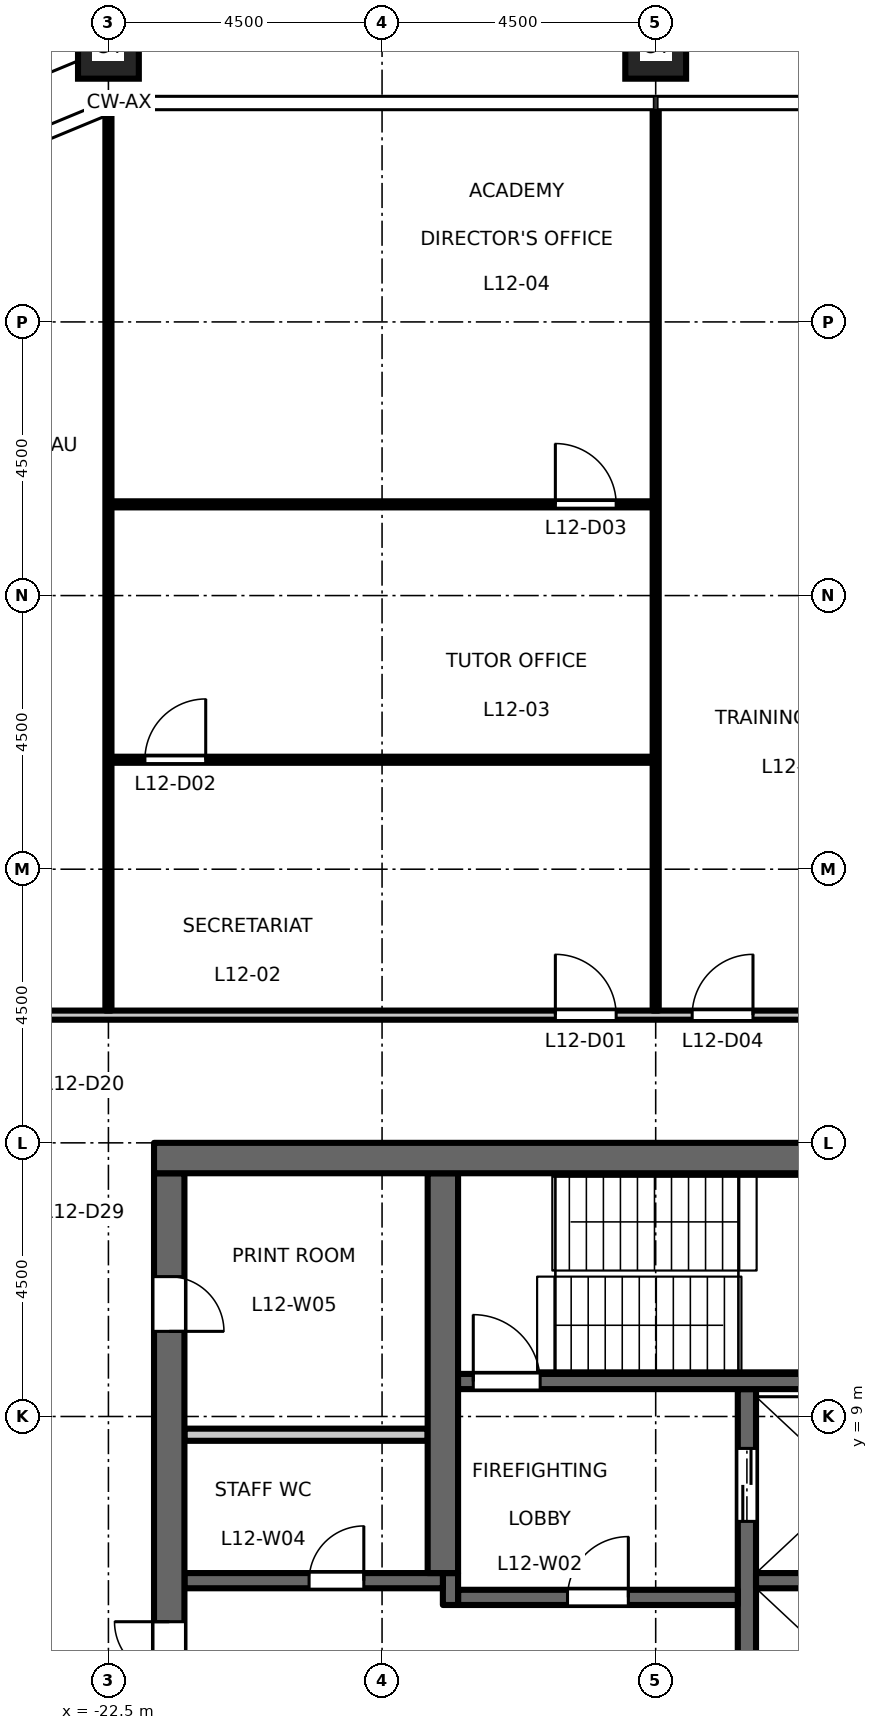
"""IFC4 building model, lengths in metres.
Left out: names, types, materials, properties, quantities, classifications, styles, units other than length and angle.
Written with IfcOpenShell. Run it as: python <this file> out.ifc"""

import sys

from ifc_helpers import new_model, si_unit, direction, frame, frame_2d, origin, origin_2d, place, context, subcontext, project, spatial, rectangle, hollow_rectangle, extrude, element, fill, save


model = new_model("IFC4")
c1 = context("Model", 3, precision=1e-05, world=origin(), true_north=direction((0.0, 1.0)))
c2 = subcontext(c1, "Body", "Model", "MODEL_VIEW")
j1 = project(units=[si_unit("LENGTHUNIT", "METRE"), si_unit("PLANEANGLEUNIT", "RADIAN")], contexts=[c1])
p1 = place(None, origin())
s1 = spatial("IfcSite", under=j1, at=p1, CompositionType="ELEMENT")
p2 = place(p1, origin())
s2 = spatial("IfcBuilding", under=s1, at=p2, CompositionType="ELEMENT")
p3 = place(p2, frame((0.0, 0.0, 58.2)))
s3 = spatial("IfcBuildingStorey", under=s2, at=p3, CompositionType="ELEMENT", Elevation=58.2)
for number, where, z_axis, x_axis in (
    (1, (-13.5, 31.5, 0.0), (0.0, 0.0, 1.0), (1.0, 0.0, 0.0)),
    (2, (-22.5, 31.5, 0.0), (0.0, 0.0, 1.0), (1.0, 0.0, 0.0)),
):
    element("IfcColumn", number, at=place(p3, frame(where, z_axis=z_axis, x_axis=x_axis)), inside=s3, PredefinedType="COLUMN", context=c2, shape_type="SweptSolid", body=[
        extrude(hollow_rectangle(XDim=1.0, YDim=1.0, WallThickness=0.06, at=origin_2d()), origin(), (0.0, 0.0, 1.0), 4.5),
    ])
p4 = place(p3, frame((-12.0, -9.45, 0.0), z_axis=(0.0, 0.0, 1.0), x_axis=(0.0, 1.0, 0.0)))
e3 = element("IfcWall", 3, at=p4, inside=s3, PredefinedType="SHEAR", context=c2, shape_type="SweptSolid", body=[
    extrude(rectangle(XDim=18.9, YDim=0.3, at=frame_2d((9.45, 0.0))), origin(), (0.0, 0.0, 1.0), 4.35),
])
p5 = place(p4, frame((3.625, 0.0, 0.0)))
e4 = element("IfcOpeningElement", 4, at=p5, cuts=e3, PredefinedType="OPENING", context=c2, shape_type="SweptSolid", body=[
    extrude(rectangle(XDim=1.1, YDim=2.1, at=frame_2d((0.55, 1.05))), frame((0.0, 0.16, 0.0), z_axis=(0.0, -1.0, 0.0), x_axis=(1.0, 0.0, 0.0)), (0.0, 0.0, 1.0), 0.32),
])
p6 = place(p4, frame((6.775, 0.0, 0.0)))
e5 = element("IfcOpeningElement", 5, at=p6, cuts=e3, PredefinedType="OPENING", context=c2, shape_type="SweptSolid", body=[
    extrude(rectangle(XDim=1.1, YDim=2.1, at=frame_2d((0.55, 1.05))), frame((0.0, 0.16, 0.0), z_axis=(0.0, -1.0, 0.0), x_axis=(1.0, 0.0, 0.0)), (0.0, 0.0, 1.0), 0.32),
])
p7 = place(p4, frame((9.925, 0.0, 0.0)))
e6 = element("IfcOpeningElement", 6, at=p7, cuts=e3, PredefinedType="OPENING", context=c2, shape_type="SweptSolid", body=[
    extrude(rectangle(XDim=1.1, YDim=2.1, at=frame_2d((0.55, 1.05))), frame((0.0, 0.16, 0.0), z_axis=(0.0, -1.0, 0.0), x_axis=(1.0, 0.0, 0.0)), (0.0, 0.0, 1.0), 0.32),
])
p8 = place(p4, frame((13.075, 0.0, 0.0)))
e7 = element("IfcOpeningElement", 7, at=p8, cuts=e3, PredefinedType="OPENING", context=c2, shape_type="SweptSolid", body=[
    extrude(rectangle(XDim=1.1, YDim=2.1, at=frame_2d((0.55, 1.05))), frame((0.0, 0.16, 0.0), z_axis=(0.0, -1.0, 0.0), x_axis=(1.0, 0.0, 0.0)), (0.0, 0.0, 1.0), 0.32),
])
p9 = place(p4, frame((16.725, 0.0, 0.0)))
e8 = element("IfcOpeningElement", 8, at=p9, cuts=e3, PredefinedType="OPENING", context=c2, shape_type="SweptSolid", body=[
    extrude(rectangle(XDim=1.2, YDim=2.1, at=frame_2d((0.6, 1.05))), frame((0.0, 0.16, 0.0), z_axis=(0.0, -1.0, 0.0), x_axis=(1.0, 0.0, 0.0)), (0.0, 0.0, 1.0), 0.32),
])
p10 = place(p4, frame((0.975, 0.0, 0.0)))
e9 = element("IfcOpeningElement", 9, at=p10, cuts=e3, PredefinedType="OPENING", context=c2, shape_type="SweptSolid", body=[
    extrude(rectangle(XDim=1.2, YDim=2.1, at=frame_2d((0.6, 1.05))), frame((0.0, 0.16, 0.0), z_axis=(0.0, -1.0, 0.0), x_axis=(1.0, 0.0, 0.0)), (0.0, 0.0, 1.0), 0.32),
])
p11 = place(p3, frame((-12.15, 6.025, 0.0), z_axis=(0.0, 0.0, 1.0), x_axis=(-1.0, 0.0, 0.0)))
e10 = element("IfcWall", 10, at=p11, inside=s3, PredefinedType="SHEAR", context=c2, shape_type="SweptSolid", body=[
    extrude(rectangle(XDim=4.6, YDim=0.25, at=frame_2d((2.3, 0.0))), origin(), (0.0, 0.0, 1.0), 4.35),
])
p12 = place(p11, frame((1.8, 0.0, 0.0)))
e11 = element("IfcOpeningElement", 11, at=p12, cuts=e10, PredefinedType="OPENING", context=c2, shape_type="SweptSolid", body=[
    extrude(rectangle(XDim=1.0, YDim=2.1, at=frame_2d((0.5, 1.05))), frame((0.0, 0.135, 0.0), z_axis=(0.0, -1.0, 0.0), x_axis=(1.0, 0.0, 0.0)), (0.0, 0.0, 1.0), 0.27),
])
p13 = place(p3, frame((-16.875, 5.9, 0.0), z_axis=(0.0, 0.0, 1.0), x_axis=(0.0, 1.0, 0.0)))
e12 = element("IfcWall", 12, at=p13, inside=s3, PredefinedType="SHEAR", context=c2, shape_type="SweptSolid", body=[
    extrude(rectangle(XDim=0.525, YDim=0.25, at=frame_2d((0.263, 0.0))), origin(), (0.0, 0.0, 1.0), 4.35),
])
p14 = place(p3, frame((-17.0, 6.3, 0.0), z_axis=(0.0, 0.0, 1.0), x_axis=(-1.0, 0.0, 0.0)))
e13 = element("IfcWall", 13, at=p14, inside=s3, PredefinedType="SHEAR", context=c2, shape_type="SweptSolid", body=[
    extrude(rectangle(XDim=4.25, YDim=0.25, at=frame_2d((2.125, 0.0))), origin(), (0.0, 0.0, 1.0), 4.35),
])
p15 = place(p14, frame((1.3, 0.0, 0.0)))
e14 = element("IfcOpeningElement", 14, at=p15, cuts=e13, PredefinedType="OPENING", context=c2, shape_type="SweptSolid", body=[
    extrude(rectangle(XDim=0.9, YDim=2.1, at=frame_2d((0.45, 1.05))), frame((0.0, 0.135, 0.0), z_axis=(0.0, -1.0, 0.0), x_axis=(1.0, 0.0, 0.0)), (0.0, 0.0, 1.0), 0.27),
])
p16 = place(p3, frame((-21.5, -13.0, 0.0), z_axis=(0.0, 0.0, 1.0), x_axis=(0.0, 1.0, 0.0)))
e15 = element("IfcWall", 15, at=p16, inside=s3, PredefinedType="SHEAR", context=c2, shape_type="SweptSolid", body=[
    extrude(rectangle(XDim=26.0, YDim=0.5, at=frame_2d((13.0, 0.0))), origin(), (0.0, 0.0, 1.0), 4.35),
])
p17 = place(p16, frame((16.825, 0.0, 0.0)))
e16 = element("IfcOpeningElement", 16, at=p17, cuts=e15, PredefinedType="OPENING", context=c2, shape_type="SweptSolid", body=[
    extrude(rectangle(XDim=1.8, YDim=2.1, at=frame_2d((0.9, 1.05))), frame((0.0, 0.26, 0.0), z_axis=(0.0, -1.0, 0.0), x_axis=(1.0, 0.0, 0.0)), (0.0, 0.0, 1.0), 0.52),
])
p18 = place(p16, frame((7.375, 0.0, 0.0)))
e17 = element("IfcOpeningElement", 17, at=p18, cuts=e15, PredefinedType="OPENING", context=c2, shape_type="SweptSolid", body=[
    extrude(rectangle(XDim=1.8, YDim=2.1, at=frame_2d((0.9, 1.05))), frame((0.0, 0.26, 0.0), z_axis=(0.0, -1.0, 0.0), x_axis=(1.0, 0.0, 0.0)), (0.0, 0.0, 1.0), 0.52),
])
p19 = place(p16, frame((23.4, 0.0, 0.0)))
e18 = element("IfcOpeningElement", 18, at=p19, cuts=e15, PredefinedType="OPENING", context=c2, shape_type="SweptSolid", body=[
    extrude(rectangle(XDim=0.9, YDim=2.1, at=frame_2d((0.45, 1.05))), frame((0.0, 0.26, 0.0), z_axis=(0.0, -1.0, 0.0), x_axis=(1.0, 0.0, 0.0)), (0.0, 0.0, 1.0), 0.52),
])
p20 = place(p3, frame((-17.25, 8.7, 0.0), z_axis=(0.0, 0.0, 1.0), x_axis=(-1.0, 0.0, 0.0)))
e19 = element("IfcWall", 19, at=p20, inside=s3, PredefinedType="PARTITIONING", context=c2, shape_type="SweptSolid", body=[
    extrude(rectangle(XDim=4.0, YDim=0.2, at=frame_2d((2.0, 0.0))), origin(), (0.0, 0.0, 1.0), 4.35),
])
p21 = place(p3, frame((-17.0, 6.425, 0.0), z_axis=(0.0, 0.0, 1.0), x_axis=(0.0, 1.0, 0.0)))
e20 = element("IfcWall", 20, at=p21, inside=s3, PredefinedType="SHEAR", context=c2, shape_type="SweptSolid", body=[
    extrude(rectangle(XDim=6.575, YDim=0.5, at=frame_2d((3.288, 0.0))), origin(), (0.0, 0.0, 1.0), 4.35),
])
p22 = place(p3, frame((-8.75, 6.3, 0.0), z_axis=(0.0, 0.0, 1.0), x_axis=(-1.0, 0.0, 0.0)))
e21 = element("IfcWall", 21, at=p22, inside=s3, PredefinedType="SHEAR", context=c2, shape_type="SweptSolid", body=[
    extrude(rectangle(XDim=3.1, YDim=0.25, at=frame_2d((1.55, 0.0))), origin(), (0.0, 0.0, 1.0), 4.35),
])
p23 = place(p3, frame((-8.75, 9.575, 0.0), z_axis=(0.0, 0.0, 1.0), x_axis=(-1.0, 0.0, 0.0)))
e22 = element("IfcWall", 22, at=p23, inside=s3, PredefinedType="SHEAR", context=c2, shape_type="SweptSolid", body=[
    extrude(rectangle(XDim=8.0, YDim=0.25, at=frame_2d((4.0, 0.0))), origin(), (0.0, 0.0, 1.0), 4.35),
])
p24 = place(p23, frame((6.65, 0.0, 0.0)))
e23 = element("IfcOpeningElement", 23, at=p24, cuts=e22, PredefinedType="OPENING", context=c2, shape_type="SweptSolid", body=[
    extrude(rectangle(XDim=1.1, YDim=2.1, at=frame_2d((0.55, 1.05))), frame((0.0, 0.135, 0.0), z_axis=(0.0, -1.0, 0.0), x_axis=(1.0, 0.0, 0.0)), (0.0, 0.0, 1.0), 0.27),
])
p25 = place(p3, frame((-8.25, 13.25, 0.0), z_axis=(0.0, 0.0, 1.0), x_axis=(-1.0, 0.0, 0.0)))
e24 = element("IfcWall", 24, at=p25, inside=s3, PredefinedType="SHEAR", context=c2, shape_type="SweptSolid", body=[
    extrude(rectangle(XDim=13.5, YDim=0.5, at=frame_2d((6.75, 0.0))), origin(), (0.0, 0.0, 1.0), 4.35),
])
p26 = place(p3, frame((-23.925, 15.6, 0.0), z_axis=(0.0, 0.0, 1.0), x_axis=(1.0, 0.0, 0.0)))
e25 = element("IfcWall", 25, at=p26, inside=s3, PredefinedType="PARTITIONING", context=c2, shape_type="SweptSolid", body=[
    extrude(rectangle(XDim=47.85, YDim=0.15, at=frame_2d((23.925, 0.0))), origin(), (0.0, 0.0, 1.0), 4.35),
])
p27 = place(p26, frame((8.775, 0.0, 0.0)))
e26 = element("IfcOpeningElement", 26, at=p27, cuts=e25, PredefinedType="OPENING", context=c2, shape_type="SweptSolid", body=[
    extrude(rectangle(XDim=1.0, YDim=2.1, at=frame_2d((0.5, 1.05))), frame((0.0, 0.085, 0.0), z_axis=(0.0, -1.0, 0.0), x_axis=(1.0, 0.0, 0.0)), (0.0, 0.0, 1.0), 0.17),
])
p28 = place(p26, frame((11.025, 0.0, 0.0)))
e27 = element("IfcOpeningElement", 27, at=p28, cuts=e25, PredefinedType="OPENING", context=c2, shape_type="SweptSolid", body=[
    extrude(rectangle(XDim=1.0, YDim=2.1, at=frame_2d((0.5, 1.05))), frame((0.0, 0.085, 0.0), z_axis=(0.0, -1.0, 0.0), x_axis=(1.0, 0.0, 0.0)), (0.0, 0.0, 1.0), 0.17),
])
p29 = place(p26, frame((26.775, 0.0, 0.0)))
e28 = element("IfcOpeningElement", 28, at=p29, cuts=e25, PredefinedType="OPENING", context=c2, shape_type="SweptSolid", body=[
    extrude(rectangle(XDim=1.0, YDim=2.1, at=frame_2d((0.5, 1.05))), frame((0.0, 0.085, 0.0), z_axis=(0.0, -1.0, 0.0), x_axis=(1.0, 0.0, 0.0)), (0.0, 0.0, 1.0), 0.17),
])
p30 = place(p26, frame((29.025, 0.0, 0.0)))
e29 = element("IfcOpeningElement", 29, at=p30, cuts=e25, PredefinedType="OPENING", context=c2, shape_type="SweptSolid", body=[
    extrude(rectangle(XDim=1.0, YDim=2.1, at=frame_2d((0.5, 1.05))), frame((0.0, 0.085, 0.0), z_axis=(0.0, -1.0, 0.0), x_axis=(1.0, 0.0, 0.0)), (0.0, 0.0, 1.0), 0.17),
])
p31 = place(p26, frame((38.025, 0.0, 0.0)))
e30 = element("IfcOpeningElement", 30, at=p31, cuts=e25, PredefinedType="OPENING", context=c2, shape_type="SweptSolid", body=[
    extrude(rectangle(XDim=1.0, YDim=2.1, at=frame_2d((0.5, 1.05))), frame((0.0, 0.085, 0.0), z_axis=(0.0, -1.0, 0.0), x_axis=(1.0, 0.0, 0.0)), (0.0, 0.0, 1.0), 0.17),
])
p32 = place(p3, frame((-22.45, 19.8, 0.0), z_axis=(0.0, 0.0, 1.0), x_axis=(1.0, 0.0, 0.0)))
e31 = element("IfcWall", 31, at=p32, inside=s3, PredefinedType="PARTITIONING", context=c2, shape_type="SweptSolid", body=[
    extrude(rectangle(XDim=8.9, YDim=0.1, at=frame_2d((4.45, 0.0))), origin(), (0.0, 0.0, 1.0), 4.35),
])
p33 = place(p32, frame((0.55, 0.0, 0.0)))
e32 = element("IfcOpeningElement", 32, at=p33, cuts=e31, PredefinedType="OPENING", context=c2, shape_type="SweptSolid", body=[
    extrude(rectangle(XDim=1.0, YDim=2.1, at=frame_2d((0.5, 1.05))), frame((0.0, 0.06, 0.0), z_axis=(0.0, -1.0, 0.0), x_axis=(1.0, 0.0, 0.0)), (0.0, 0.0, 1.0), 0.12),
])
p34 = place(p3, frame((-22.45, 24.0, 0.0), z_axis=(0.0, 0.0, 1.0), x_axis=(1.0, 0.0, 0.0)))
e33 = element("IfcWall", 33, at=p34, inside=s3, PredefinedType="PARTITIONING", context=c2, shape_type="SweptSolid", body=[
    extrude(rectangle(XDim=8.9, YDim=0.1, at=frame_2d((4.45, 0.0))), origin(), (0.0, 0.0, 1.0), 3.85),
])
p35 = place(p34, frame((7.3, 0.0, 0.0)))
e34 = element("IfcOpeningElement", 34, at=p35, cuts=e33, PredefinedType="OPENING", context=c2, shape_type="SweptSolid", body=[
    extrude(rectangle(XDim=1.0, YDim=2.1, at=frame_2d((0.5, 1.05))), frame((0.0, 0.06, 0.0), z_axis=(0.0, -1.0, 0.0), x_axis=(1.0, 0.0, 0.0)), (0.0, 0.0, 1.0), 0.12),
])
p36 = place(p3, frame((-22.5, 15.675, 0.0), z_axis=(0.0, 0.0, 1.0), x_axis=(0.0, 1.0, 0.0)))
e35 = element("IfcWall", 35, at=p36, inside=s3, PredefinedType="PARTITIONING", context=c2, shape_type="SweptSolid", body=[
    extrude(rectangle(XDim=14.753, YDim=0.1, at=frame_2d((7.376, 0.0))), origin(), (0.0, 0.0, 1.0), 3.35),
])
p37 = place(p3, frame((-13.5, 15.675, 0.0), z_axis=(0.0, 0.0, 1.0), x_axis=(0.0, 1.0, 0.0)))
e36 = element("IfcWall", 36, at=p37, inside=s3, PredefinedType="PARTITIONING", context=c2, shape_type="SweptSolid", body=[
    extrude(rectangle(XDim=14.835, YDim=0.1, at=frame_2d((7.417, 0.0))), origin(), (0.0, 0.0, 1.0), 3.35),
])
p38 = place(p12, origin())
e37 = element("IfcDoor", 37, at=p38, inside=s3, OperationType="SINGLE_SWING_LEFT", PredefinedType="DOOR", context=c2, shape_type="SweptSolid", body=[
    extrude(rectangle(XDim=1.0, YDim=2.1, at=frame_2d((0.5, 1.05))), frame((0.0, 0.025, 0.0), z_axis=(0.0, -1.0, 0.0), x_axis=(1.0, 0.0, 0.0)), (0.0, 0.0, 1.0), 0.05),
])
fill(e11, e37)
p39 = place(p24, origin())
e38 = element("IfcDoor", 38, at=p39, inside=s3, OperationType="SINGLE_SWING_RIGHT", PredefinedType="DOOR", context=c2, shape_type="SweptSolid", body=[
    extrude(rectangle(XDim=1.1, YDim=2.1, at=frame_2d((0.55, 1.05))), frame((0.0, 0.025, 0.0), z_axis=(0.0, -1.0, 0.0), x_axis=(1.0, 0.0, 0.0)), (0.0, 0.0, 1.0), 0.05),
])
fill(e23, e38)
p40 = place(p17, origin())
e39 = element("IfcDoor", 39, at=p40, inside=s3, OperationType="DOUBLE_DOOR_DOUBLE_SWING", PredefinedType="DOOR", context=c2, shape_type="SweptSolid", body=[
    extrude(rectangle(XDim=1.8, YDim=2.1, at=frame_2d((0.9, 1.05))), frame((0.0, 0.025, 0.0), z_axis=(0.0, -1.0, 0.0), x_axis=(1.0, 0.0, 0.0)), (0.0, 0.0, 1.0), 0.05),
])
fill(e16, e39)
p41 = place(p9, origin())
e40 = element("IfcDoor", 40, at=p41, inside=s3, OperationType="DOUBLE_DOOR_SLIDING", PredefinedType="DOOR", context=c2, shape_type="SweptSolid", body=[
    extrude(rectangle(XDim=1.2, YDim=2.1, at=frame_2d((0.6, 1.05))), frame((0.0, 0.025, 0.0), z_axis=(0.0, -1.0, 0.0), x_axis=(1.0, 0.0, 0.0)), (0.0, 0.0, 1.0), 0.05),
])
fill(e8, e40)
p42 = place(p15, origin())
e41 = element("IfcDoor", 41, at=p42, inside=s3, OperationType="SINGLE_SWING_LEFT", PredefinedType="DOOR", context=c2, shape_type="SweptSolid", body=[
    extrude(rectangle(XDim=0.9, YDim=2.1, at=frame_2d((0.45, 1.05))), frame((0.0, 0.025, 0.0), z_axis=(0.0, -1.0, 0.0), x_axis=(1.0, 0.0, 0.0)), (0.0, 0.0, 1.0), 0.05),
])
fill(e14, e41)
p43 = place(p19, origin())
e42 = element("IfcDoor", 42, at=p43, inside=s3, OperationType="SINGLE_SWING_LEFT", PredefinedType="DOOR", context=c2, shape_type="SweptSolid", body=[
    extrude(rectangle(XDim=0.9, YDim=2.1, at=frame_2d((0.45, 1.05))), frame((0.0, 0.025, 0.0), z_axis=(0.0, -1.0, 0.0), x_axis=(1.0, 0.0, 0.0)), (0.0, 0.0, 1.0), 0.05),
])
fill(e18, e42)
p44 = place(p27, origin())
e43 = element("IfcDoor", 43, at=p44, inside=s3, OperationType="SINGLE_SWING_LEFT", PredefinedType="DOOR", context=c2, shape_type="SweptSolid", body=[
    extrude(rectangle(XDim=1.0, YDim=2.1, at=frame_2d((0.5, 1.05))), frame((0.0, 0.025, 0.0), z_axis=(0.0, -1.0, 0.0), x_axis=(1.0, 0.0, 0.0)), (0.0, 0.0, 1.0), 0.05),
])
fill(e26, e43)
p45 = place(p33, origin())
e44 = element("IfcDoor", 44, at=p45, inside=s3, OperationType="SINGLE_SWING_RIGHT", PredefinedType="DOOR", context=c2, shape_type="SweptSolid", body=[
    extrude(rectangle(XDim=1.0, YDim=2.1, at=frame_2d((0.5, 1.05))), frame((0.0, 0.025, 0.0), z_axis=(0.0, -1.0, 0.0), x_axis=(1.0, 0.0, 0.0)), (0.0, 0.0, 1.0), 0.05),
])
fill(e32, e44)
p46 = place(p35, origin())
e45 = element("IfcDoor", 45, at=p46, inside=s3, OperationType="SINGLE_SWING_LEFT", PredefinedType="DOOR", context=c2, shape_type="SweptSolid", body=[
    extrude(rectangle(XDim=1.0, YDim=2.1, at=frame_2d((0.5, 1.05))), frame((0.0, 0.025, 0.0), z_axis=(0.0, -1.0, 0.0), x_axis=(1.0, 0.0, 0.0)), (0.0, 0.0, 1.0), 0.05),
])
fill(e34, e45)
p47 = place(p28, origin())
e46 = element("IfcDoor", 46, at=p47, inside=s3, OperationType="SINGLE_SWING_RIGHT", PredefinedType="DOOR", context=c2, shape_type="SweptSolid", body=[
    extrude(rectangle(XDim=1.0, YDim=2.1, at=frame_2d((0.5, 1.05))), frame((0.0, 0.025, 0.0), z_axis=(0.0, -1.0, 0.0), x_axis=(1.0, 0.0, 0.0)), (0.0, 0.0, 1.0), 0.05),
])
fill(e27, e46)
save(model, sys.argv[1])
